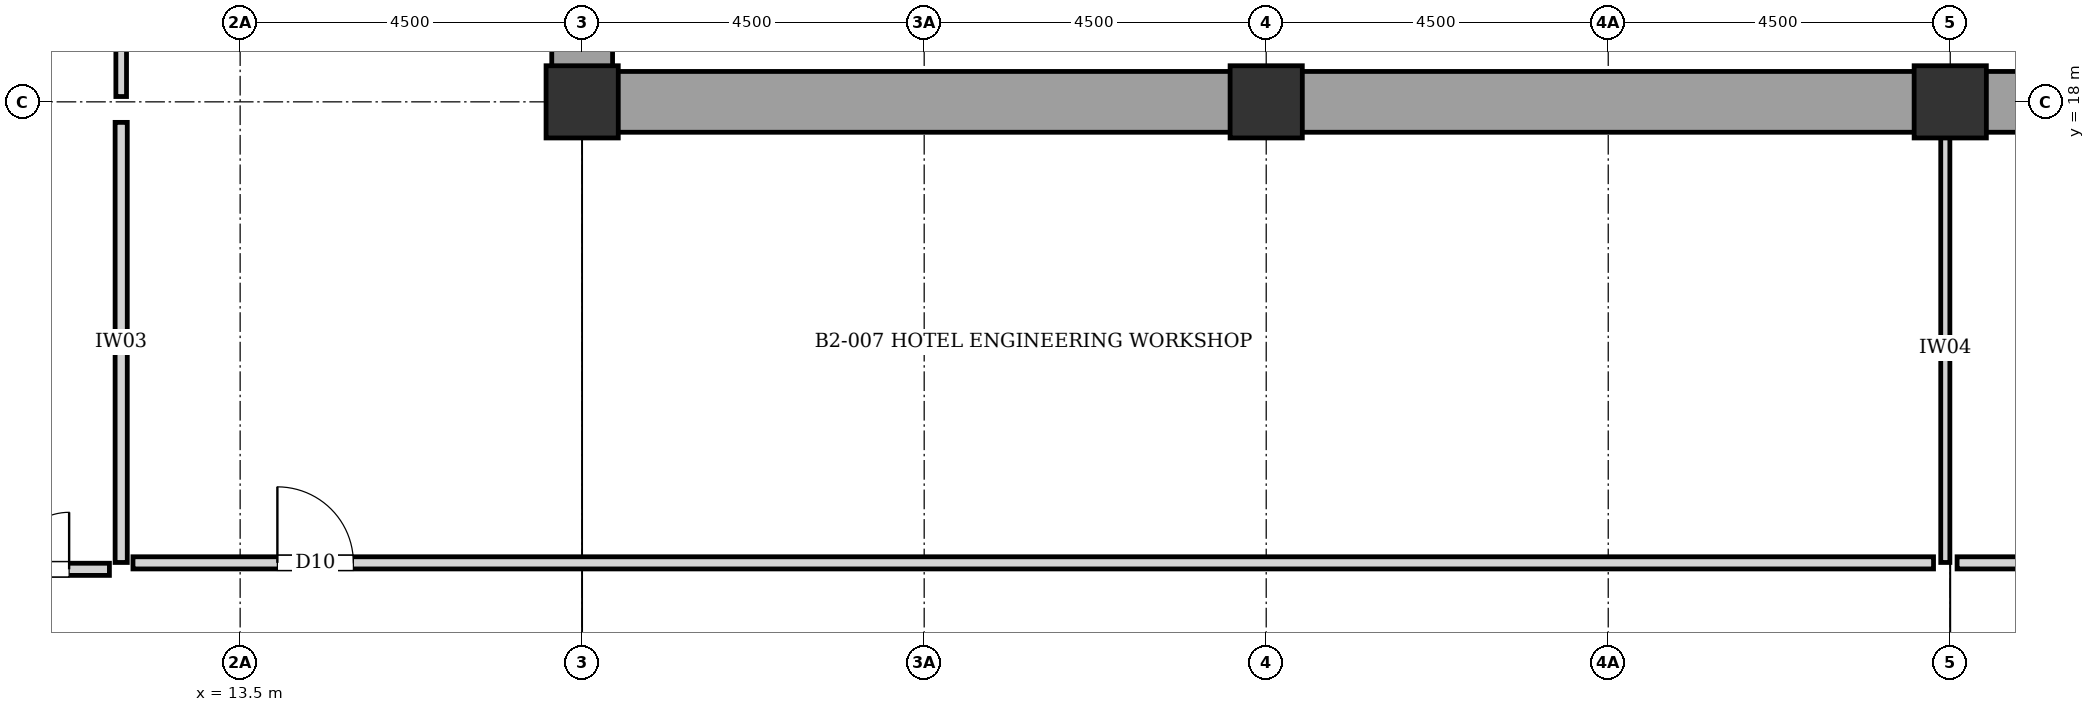
"""IFC4 building model, lengths in metres.
Left out: names, types, materials, properties, quantities, classifications, styles, units other than length and angle.
Written with IfcOpenShell. Run it as: python <this file> out.ifc"""

import sys

from ifc_helpers import new_model, si_unit, direction, frame, frame_2d, origin, origin_2d, place, context, subcontext, project, spatial, rectangle, extrude, element, fill, save


model = new_model("IFC4")
c1 = context("Model", 3, precision=1e-05, world=origin(), true_north=direction((0.0, 1.0)))
c2 = subcontext(c1, "Body", "Model", "MODEL_VIEW")
j1 = project(units=[si_unit("LENGTHUNIT", "METRE"), si_unit("PLANEANGLEUNIT", "RADIAN")], contexts=[c1])
p1 = place(None, origin())
s1 = spatial("IfcSite", under=j1, at=p1, CompositionType="ELEMENT")
p2 = place(p1, origin())
s2 = spatial("IfcBuilding", under=s1, at=p2, CompositionType="ELEMENT")
p3 = place(p2, frame((0.0, 0.0, -8.96)))
s3 = spatial("IfcBuildingStorey", under=s2, at=p3, CompositionType="ELEMENT", Elevation=-8.96)
for number, where, z_axis, x_axis in (
    (1, (18.0, 18.0, 0.0), (0.0, 0.0, 1.0), (1.0, 0.0, 0.0)),
    (2, (27.0, 18.0, 0.0), (0.0, 0.0, 1.0), (1.0, 0.0, 0.0)),
    (3, (36.0, 18.0, 0.0), (0.0, 0.0, 1.0), (1.0, 0.0, 0.0)),
):
    element("IfcColumn", number, at=place(p3, frame(where, z_axis=z_axis, x_axis=x_axis)), inside=s3, PredefinedType="COLUMN", context=c2, shape_type="SweptSolid", body=[
        extrude(rectangle(XDim=0.95, YDim=0.95, at=origin_2d()), origin(), (0.0, 0.0, 1.0), 4.48),
    ])
for number, where, z_axis, x_axis in (
    (4, (18.0, 27.0, 0.0), (0.0, 0.0, 1.0), (0.0, -1.0, 0.0)),
    (5, (18.0, 18.0, 0.0), (0.0, 0.0, 1.0), (1.0, 0.0, 0.0)),
    (6, (27.0, 18.0, 0.0), (0.0, 0.0, 1.0), (1.0, 0.0, 0.0)),
    (7, (36.0, 18.0, 0.0), (0.0, 0.0, 1.0), (1.0, 0.0, 0.0)),
):
    element("IfcWall", number, at=place(p3, frame(where, z_axis=z_axis, x_axis=x_axis)), inside=s3, PredefinedType="USERDEFINED", context=c2, shape_type="SweptSolid", body=[
        extrude(rectangle(XDim=9.0, YDim=0.8, at=frame_2d((4.5, 0.0))), origin(), (0.0, 0.0, 1.0), 4.2),
    ])
p4 = place(p3, frame((11.935, 11.94, 0.0), z_axis=(0.0, 0.0, 1.0), x_axis=(0.0, 1.0, 0.0)))
e8 = element("IfcWall", 8, at=p4, inside=s3, PredefinedType="PARTITIONING", context=c2, shape_type="SweptSolid", body=[
    extrude(rectangle(XDim=5.79, YDim=0.16, at=frame_2d((2.895, 0.0))), origin(), (0.0, 0.0, 1.0), 4.2),
])
p5 = place(p3, frame((35.935, 11.94, 0.0), z_axis=(0.0, 0.0, 1.0), x_axis=(0.0, 1.0, 0.0)))
e9 = element("IfcWall", 9, at=p5, inside=s3, PredefinedType="PARTITIONING", context=c2, shape_type="SweptSolid", body=[
    extrude(rectangle(XDim=5.655, YDim=0.12, at=frame_2d((2.828, 0.0))), origin(), (0.0, 0.0, 1.0), 3.3),
])
p6 = place(p3, frame((9.22, 11.85, 0.0), z_axis=(0.0, 0.0, 1.0), x_axis=(1.0, 0.0, 0.0)))
e10 = element("IfcWall", 10, at=p6, inside=s3, PredefinedType="PARTITIONING", context=c2, shape_type="SweptSolid", body=[
    extrude(rectangle(XDim=2.56, YDim=0.16, at=frame_2d((1.28, 0.0))), origin(), (0.0, 0.0, 1.0), 4.2),
])
p7 = place(p6, frame((0.53, 0.0, 0.0)))
e11 = element("IfcOpeningElement", 11, at=p7, cuts=e10, PredefinedType="OPENING", context=c2, shape_type="SweptSolid", body=[
    extrude(rectangle(XDim=1.5, YDim=2.1, at=frame_2d((0.75, 1.05))), frame((0.0, 0.09, 0.0), z_axis=(0.0, -1.0, 0.0), x_axis=(1.0, 0.0, 0.0)), (0.0, 0.0, 1.0), 0.18),
])
p8 = place(p3, frame((12.09, 11.935, 0.0), z_axis=(0.0, 0.0, 1.0), x_axis=(1.0, 0.0, 0.0)))
e12 = element("IfcWall", 12, at=p8, inside=s3, PredefinedType="PARTITIONING", context=c2, shape_type="SweptSolid", body=[
    extrude(rectangle(XDim=23.69, YDim=0.16, at=frame_2d((11.845, 0.0))), origin(), (0.0, 0.0, 1.0), 4.2),
])
p9 = place(p8, frame((1.9, 0.0, 0.0)))
e13 = element("IfcOpeningElement", 13, at=p9, cuts=e12, PredefinedType="OPENING", context=c2, shape_type="SweptSolid", body=[
    extrude(rectangle(XDim=1.0, YDim=2.1, at=frame_2d((0.5, 1.05))), frame((0.0, 0.09, 0.0), z_axis=(0.0, -1.0, 0.0), x_axis=(1.0, 0.0, 0.0)), (0.0, 0.0, 1.0), 0.18),
])
p10 = place(p3, frame((36.09, 11.935, 0.0), z_axis=(0.0, 0.0, 1.0), x_axis=(1.0, 0.0, 0.0)))
e14 = element("IfcWall", 14, at=p10, inside=s3, PredefinedType="PARTITIONING", context=c2, shape_type="SweptSolid", body=[
    extrude(rectangle(XDim=35.58, YDim=0.16, at=frame_2d((17.79, 0.0))), origin(), (0.0, 0.0, 1.0), 4.2),
])
p11 = place(p10, frame((13.021, 0.0, 0.0)))
e15 = element("IfcOpeningElement", 15, at=p11, cuts=e14, PredefinedType="OPENING", context=c2, shape_type="SweptSolid", body=[
    extrude(rectangle(XDim=1.0, YDim=2.1, at=frame_2d((0.5, 1.05))), frame((0.0, 0.09, 0.0), z_axis=(0.0, -1.0, 0.0), x_axis=(1.0, 0.0, 0.0)), (0.0, 0.0, 1.0), 0.18),
])
p12 = place(p3, frame((11.935, 18.07, 0.0), z_axis=(0.0, 0.0, 1.0), x_axis=(0.0, 1.0, 0.0)))
e16 = element("IfcWall", 16, at=p12, inside=s3, PredefinedType="PLUMBINGWALL", context=c2, shape_type="SweptSolid", body=[
    extrude(rectangle(XDim=4.21, YDim=0.14, at=frame_2d((2.105, 0.0))), origin(), (0.0, 0.0, 1.0), 4.2),
])
p13 = place(p12, frame((2.16, 0.0, 0.0)))
e17 = element("IfcOpeningElement", 17, at=p13, cuts=e16, PredefinedType="OPENING", context=c2, shape_type="SweptSolid", body=[
    extrude(rectangle(XDim=0.9, YDim=2.1, at=frame_2d((0.45, 1.05))), frame((0.0, 0.08, 0.0), z_axis=(0.0, -1.0, 0.0), x_axis=(1.0, 0.0, 0.0)), (0.0, 0.0, 1.0), 0.16),
])
p14 = place(p7, origin())
e18 = element("IfcDoor", 18, at=p14, inside=s3, OperationType="DOUBLE_DOOR_SINGLE_SWING", PredefinedType="DOOR", context=c2, shape_type="SweptSolid", body=[
    extrude(rectangle(XDim=1.5, YDim=2.1, at=frame_2d((0.75, 1.05))), frame((0.0, 0.025, 0.0), z_axis=(0.0, -1.0, 0.0), x_axis=(1.0, 0.0, 0.0)), (0.0, 0.0, 1.0), 0.05),
])
fill(e11, e18)
p15 = place(p9, origin())
e19 = element("IfcDoor", 19, at=p15, inside=s3, OperationType="SINGLE_SWING_LEFT", PredefinedType="DOOR", context=c2, shape_type="SweptSolid", body=[
    extrude(rectangle(XDim=1.0, YDim=2.1, at=frame_2d((0.5, 1.05))), frame((0.0, 0.025, 0.0), z_axis=(0.0, -1.0, 0.0), x_axis=(1.0, 0.0, 0.0)), (0.0, 0.0, 1.0), 0.05),
])
fill(e13, e19)
save(model, sys.argv[1])
